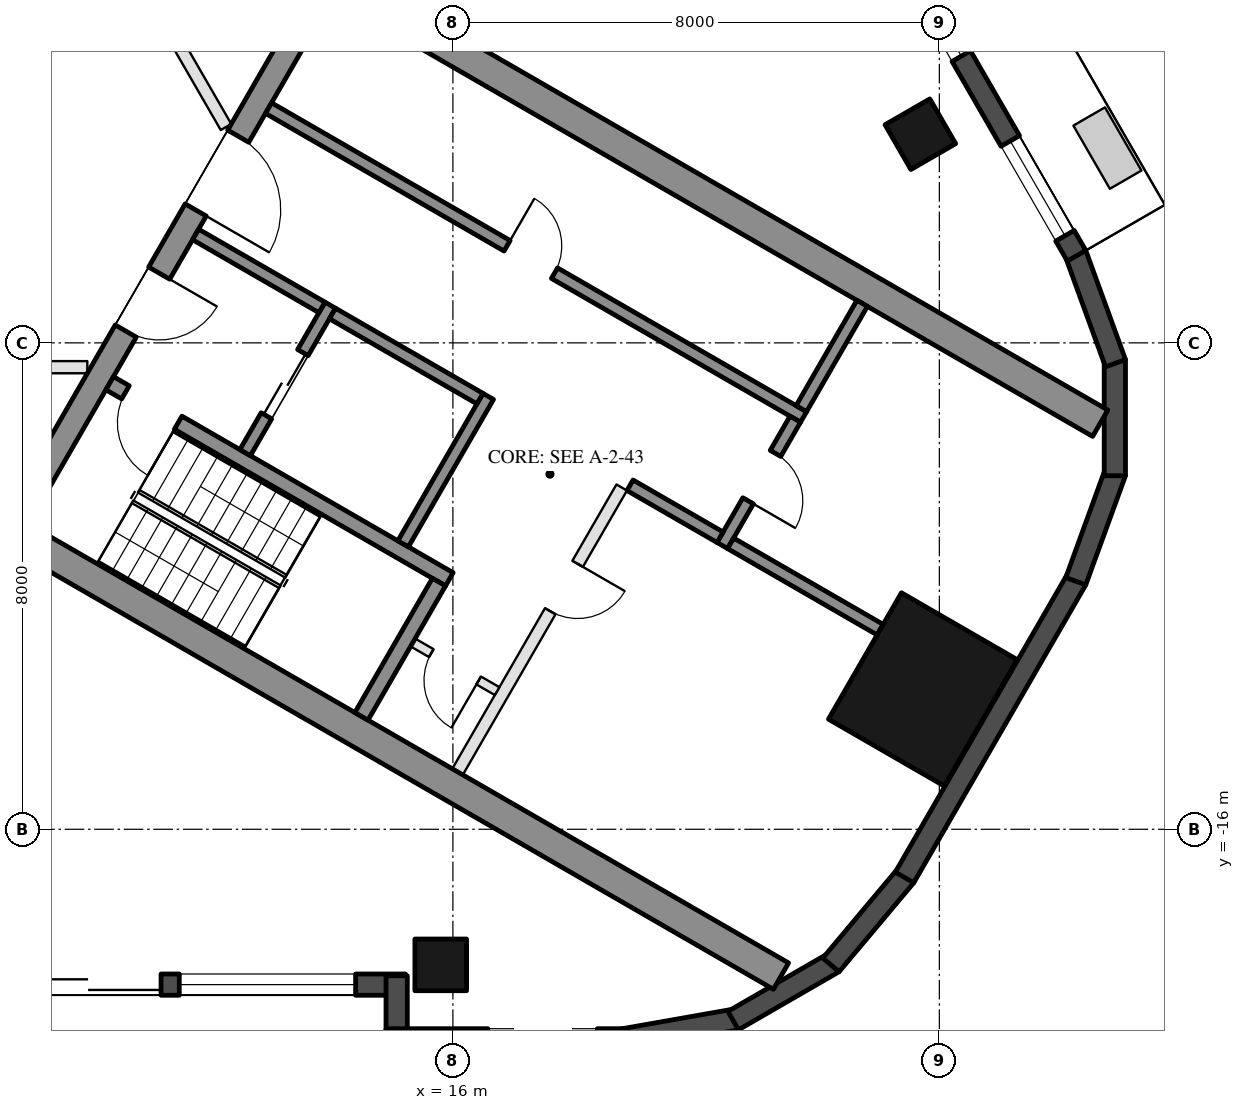
"""IFC4 building model, lengths in metres.
Left out: names, types, materials, properties, quantities, classifications, styles, units other than length and angle.
Written with IfcOpenShell. Run it as: python <this file> out.ifc"""

import sys

from ifc_helpers import new_model, si_unit, direction, frame, frame_2d, origin, origin_2d, place, context, subcontext, project, spatial, rectangle, hollow_rectangle, extrude, element, fill, save


model = new_model("IFC4")
c1 = context("Model", 3, precision=1e-05, world=origin(), true_north=direction((0.0, 1.0)))
c2 = subcontext(c1, "Body", "Model", "MODEL_VIEW")
j1 = project(units=[si_unit("LENGTHUNIT", "METRE"), si_unit("PLANEANGLEUNIT", "RADIAN")], contexts=[c1])
p1 = place(None, origin())
s1 = spatial("IfcSite", under=j1, at=p1, CompositionType="ELEMENT")
p2 = place(p1, origin())
s2 = spatial("IfcBuilding", under=s1, at=p2, CompositionType="ELEMENT")
p3 = place(p2, frame((0.0, 0.0, 183.6)))
s3 = spatial("IfcBuildingStorey", under=s2, at=p3, CompositionType="ELEMENT", Elevation=183.6)
for number, where, z_axis, x_axis in (
    (1, (15.8, -18.23, 0.0), (0.0, 0.0, 1.0), (-1.0, 0.0, 0.0)),
    (2, (23.688, -4.568, 0.0), (0.0, 0.0, 1.0), (-0.5, 0.866, 0.0)),
):
    element("IfcColumn", number, at=place(p3, frame(where, z_axis=z_axis, x_axis=x_axis)), inside=s3, PredefinedType="COLUMN", context=c2, shape_type="SweptSolid", body=[
        extrude(hollow_rectangle(XDim=0.85, YDim=0.85, WallThickness=0.04, at=origin_2d()), origin(), (0.0, 0.0, 1.0), 3.7),
    ])
p4 = place(p3, frame((23.729, -13.7, 0.0), z_axis=(0.0, 0.0, 1.0), x_axis=(0.5, 0.866025403784, 0.0)))
e3 = element("IfcColumn", 3, at=p4, inside=s3, PredefinedType="COLUMN", context=c2, shape_type="SweptSolid", body=[
    extrude(hollow_rectangle(XDim=2.4, YDim=2.2, WallThickness=0.06, at=origin_2d()), origin(), (0.0, 0.0, 1.0), 3.7),
])
p5 = place(p3, frame((8.48, -18.555, 0.0), z_axis=(0.0, 0.0, 1.0), x_axis=(1.0, 0.0, 0.0)))
e4 = element("IfcWall", 4, at=p5, inside=s3, PredefinedType="SOLIDWALL", context=c2, shape_type="SweptSolid", body=[
    extrude(rectangle(XDim=6.74, YDim=0.35, at=frame_2d((3.37, 0.0))), origin(), (0.0, 0.0, 1.0), 3.55),
])
p6 = place(p5, frame((0.32, 0.0, 0.0)))
e5 = element("IfcOpeningElement", 5, at=p6, cuts=e4, PredefinedType="OPENING", context=c2, shape_type="SweptSolid", body=[
    extrude(rectangle(XDim=2.4, YDim=2.4, at=frame_2d((1.2, 1.2))), frame((0.0, 0.185, 0.0), z_axis=(0.0, -1.0, 0.0), x_axis=(1.0, 0.0, 0.0)), (0.0, 0.0, 1.0), 0.37),
])
p7 = place(p5, frame((3.02, 0.0, 0.3)))
e6 = element("IfcOpeningElement", 6, at=p7, cuts=e4, PredefinedType="OPENING", context=c2, shape_type="SweptSolid", body=[
    extrude(rectangle(XDim=2.9, YDim=2.65, at=frame_2d((1.45, 1.325))), frame((0.0, 0.185, 0.0), z_axis=(0.0, -1.0, 0.0), x_axis=(1.0, 0.0, 0.0)), (0.0, 0.0, 1.0), 0.37),
])
p8 = place(p3, frame((15.075, -18.41, 0.0), z_axis=(0.0, 0.0, 1.0), x_axis=(0.0, -1.0, 0.0)))
e7 = element("IfcWall", 7, at=p8, inside=s3, PredefinedType="SOLIDWALL", context=c2, shape_type="SweptSolid", body=[
    extrude(rectangle(XDim=1.22, YDim=0.35, at=frame_2d((0.61, 0.0))), origin(), (0.0, 0.0, 1.0), 3.55),
])
p9 = place(p3, frame((14.9, -19.455, 0.0), z_axis=(0.0, 0.0, 1.0), x_axis=(1.0, 0.0, 0.0)))
e8 = element("IfcWall", 8, at=p9, inside=s3, PredefinedType="SOLIDWALL", context=c2, shape_type="SweptSolid", body=[
    extrude(rectangle(XDim=3.916, YDim=0.35, at=frame_2d((1.958, 0.0))), origin(), (0.0, 0.0, 1.0), 3.55),
])
p10 = place(p9, frame((1.675, 0.0, 0.3)))
e9 = element("IfcOpeningElement", 9, at=p10, cuts=e8, PredefinedType="OPENING", context=c2, shape_type="SweptSolid", body=[
    extrude(rectangle(XDim=1.8, YDim=2.65, at=frame_2d((0.9, 1.325))), frame((0.0, 0.185, 0.0), z_axis=(0.0, -1.0, 0.0), x_axis=(1.0, 0.0, 0.0)), (0.0, 0.0, 1.0), 0.37),
])
p11 = place(p3, frame((18.785, -19.458, 0.0), z_axis=(0.0, 0.0, 1.0), x_axis=(0.984798995425, 0.173697837091, 0.0)))
e10 = element("IfcWall", 10, at=p11, inside=s3, PredefinedType="SOLIDWALL", context=c2, shape_type="SweptSolid", body=[
    extrude(rectangle(XDim=1.91, YDim=0.35, at=frame_2d((0.955, 0.0))), origin(), (0.0, 0.0, 1.0), 3.55),
])
for number, where, z_axis, x_axis in (
    (11, (20.61, -19.147, 0.0), (0.0, 0.0, 1.0), (0.866, 0.5, 0.0)),
    (12, (22.217, -18.231, 0.0), (0.0, 0.0, 1.0), (0.643, 0.766, 0.0)),
):
    element("IfcWall", number, at=place(p3, frame(where, z_axis=z_axis, x_axis=x_axis)), inside=s3, PredefinedType="SOLIDWALL", context=c2, shape_type="SweptSolid", body=[
        extrude(rectangle(XDim=1.91, YDim=0.35, at=frame_2d((0.955, 0.0))), origin(), (0.0, 0.0, 1.0), 3.55),
    ])
p12 = place(p3, frame((23.427, -16.792, 0.0), z_axis=(0.0, 0.0, 1.0), x_axis=(0.500018773155, 0.866014564827, 0.0)))
e13 = element("IfcWall", 13, at=p12, inside=s3, PredefinedType="SOLIDWALL", context=c2, shape_type="SweptSolid", body=[
    extrude(rectangle(XDim=5.658, YDim=0.35, at=frame_2d((2.829, 0.0))), origin(), (0.0, 0.0, 1.0), 3.55),
])
for number, where, z_axis, x_axis in (
    (14, (26.244, -11.92, 0.0), (0.0, 0.0, 1.0), (0.342, 0.94, 0.0)),
    (15, (26.886, -10.185, 0.0), (0.0, 0.0, 1.0), (0.0, 1.0, 0.0)),
    (16, (26.897, -8.335, 0.0), (0.0, 0.0, 1.0), (-0.342, 0.94, 0.0)),
):
    element("IfcWall", number, at=place(p3, frame(where, z_axis=z_axis, x_axis=x_axis)), inside=s3, PredefinedType="SOLIDWALL", context=c2, shape_type="SweptSolid", body=[
        extrude(rectangle(XDim=1.91, YDim=0.35, at=frame_2d((0.955, 0.0))), origin(), (0.0, 0.0, 1.0), 3.55),
    ])
p13 = place(p3, frame((26.257, -6.567, 0.0), z_axis=(0.0, 0.0, 1.0), x_axis=(-0.500023526245, 0.866011820475, 0.0)))
e17 = element("IfcWall", 17, at=p13, inside=s3, PredefinedType="SOLIDWALL", context=c2, shape_type="SweptSolid", body=[
    extrude(rectangle(XDim=11.816, YDim=0.35, at=frame_2d((5.908, 0.0))), origin(), (0.0, 0.0, 1.0), 3.55),
])
p14 = place(p13, frame((0.38, 0.0, 0.3)))
e18 = element("IfcOpeningElement", 18, at=p14, cuts=e17, PredefinedType="OPENING", context=c2, shape_type="SweptSolid", body=[
    extrude(rectangle(XDim=1.8, YDim=2.65, at=frame_2d((0.9, 1.325))), frame((0.0, 0.185, 0.0), z_axis=(0.0, -1.0, 0.0), x_axis=(1.0, 0.0, 0.0)), (0.0, 0.0, 1.0), 0.37),
])
p15 = place(p13, frame((7.741, 0.0, 0.0)))
e19 = element("IfcOpeningElement", 19, at=p15, cuts=e17, PredefinedType="OPENING", context=c2, shape_type="SweptSolid", body=[
    extrude(rectangle(XDim=2.4, YDim=2.4, at=frame_2d((1.2, 1.2))), frame((0.0, 0.185, 0.0), z_axis=(0.0, -1.0, 0.0), x_axis=(1.0, 0.0, 0.0)), (0.0, 0.0, 1.0), 0.37),
])
p16 = place(p13, frame((3.791, 0.0, 0.3)))
e20 = element("IfcOpeningElement", 20, at=p16, cuts=e17, PredefinedType="OPENING", context=c2, shape_type="SweptSolid", body=[
    extrude(rectangle(XDim=1.6, YDim=2.65, at=frame_2d((0.8, 1.325))), frame((0.0, 0.185, 0.0), z_axis=(0.0, -1.0, 0.0), x_axis=(1.0, 0.0, 0.0)), (0.0, 0.0, 1.0), 0.37),
])
p17 = place(p13, frame((5.691, 0.0, 0.3)))
e21 = element("IfcOpeningElement", 21, at=p17, cuts=e17, PredefinedType="OPENING", context=c2, shape_type="SweptSolid", body=[
    extrude(rectangle(XDim=1.6, YDim=2.65, at=frame_2d((0.8, 1.325))), frame((0.0, 0.185, 0.0), z_axis=(0.0, -1.0, 0.0), x_axis=(1.0, 0.0, 0.0)), (0.0, 0.0, 1.0), 0.37),
])
for number, where, z_axis, x_axis in (
    (22, (8.547, -10.997, 0.0), (0.0, 0.0, 1.0), (0.866, -0.5, 0.0)),
    (23, (13.797, -1.903, 0.0), (0.0, 0.0, 1.0), (0.866, -0.5, 0.0)),
):
    element("IfcWall", number, at=place(p3, frame(where, z_axis=z_axis, x_axis=x_axis)), inside=s3, PredefinedType="SHEAR", context=c2, shape_type="SweptSolid", body=[
        extrude(rectangle(XDim=14.837, YDim=0.5, at=frame_2d((7.418, 0.0))), origin(), (0.0, 0.0, 1.0), 3.5),
    ])
p18 = place(p3, frame((8.845, -10.88, 0.0), z_axis=(0.0, 0.0, 1.0), x_axis=(0.500004234368, 0.866022959057, 0.0)))
e24 = element("IfcWall", 24, at=p18, inside=s3, PredefinedType="SHEAR", context=c2, shape_type="SweptSolid", body=[
    extrude(rectangle(XDim=10.0, YDim=0.4, at=frame_2d((5.0, 0.0))), origin(), (0.0, 0.0, 1.0), 3.5),
])
p19 = place(p18, frame((3.55, 0.0, 0.0)))
e25 = element("IfcOpeningElement", 25, at=p19, cuts=e24, PredefinedType="OPENING", context=c2, shape_type="SweptSolid", body=[
    extrude(rectangle(XDim=1.1, YDim=2.1, at=frame_2d((0.55, 1.05))), frame((0.0, 0.21, 0.0), z_axis=(0.0, -1.0, 0.0), x_axis=(1.0, 0.0, 0.0)), (0.0, 0.0, 1.0), 0.42),
])
p20 = place(p18, frame((5.85, 0.0, 0.0)))
e26 = element("IfcOpeningElement", 26, at=p20, cuts=e24, PredefinedType="OPENING", context=c2, shape_type="SweptSolid", body=[
    extrude(rectangle(XDim=1.4, YDim=2.1, at=frame_2d((0.7, 1.05))), frame((0.0, 0.21, 0.0), z_axis=(0.0, -1.0, 0.0), x_axis=(1.0, 0.0, 0.0)), (0.0, 0.0, 1.0), 0.42),
])
p21 = place(p3, frame((10.356, -8.664, 0.0), z_axis=(0.0, 0.0, 1.0), x_axis=(0.866028629588, -0.499994412703, 0.0)))
e27 = element("IfcWall", 27, at=p21, inside=s3, PredefinedType="SHEAR", context=c2, shape_type="SweptSolid", body=[
    extrude(rectangle(XDim=6.45, YDim=0.25, at=frame_2d((3.225, 0.0))), origin(), (0.0, 0.0, 1.0), 3.5),
])
p22 = place(p21, frame((0.3, 0.0, 0.0)))
e28 = element("IfcOpeningElement", 28, at=p22, cuts=e27, PredefinedType="OPENING", context=c2, shape_type="SweptSolid", body=[
    extrude(rectangle(XDim=1.0, YDim=2.1, at=frame_2d((0.5, 1.05))), frame((0.0, 0.135, 0.0), z_axis=(0.0, -1.0, 0.0), x_axis=(1.0, 0.0, 0.0)), (0.0, 0.0, 1.0), 0.27),
])
p23 = place(p3, frame((14.496, -14.143, 0.0), z_axis=(0.0, 0.0, 1.0), x_axis=(0.500062241894, 0.865989465428, 0.0)))
e29 = element("IfcWall", 29, at=p23, inside=s3, PredefinedType="SHEAR", context=c2, shape_type="SweptSolid", body=[
    extrude(rectangle(XDim=2.55, YDim=0.25, at=frame_2d((1.275, 0.0))), origin(), (0.0, 0.0, 1.0), 3.5),
])
p24 = place(p3, frame((15.181, -11.305, 0.0), z_axis=(0.0, 0.0, 1.0), x_axis=(0.49994636267, 0.866056369097, 0.0)))
e30 = element("IfcWall", 30, at=p24, inside=s3, PredefinedType="SHEAR", context=c2, shape_type="SweptSolid", body=[
    extrude(rectangle(XDim=2.8, YDim=0.2, at=frame_2d((1.4, 0.0))), origin(), (0.0, 0.0, 1.0), 3.5),
])
p25 = place(p3, frame((12.583, -9.805, 0.0), z_axis=(0.0, 0.0, 1.0), x_axis=(0.49994636267, 0.866056369097, 0.0)))
e31 = element("IfcWall", 31, at=p25, inside=s3, PredefinedType="SHEAR", context=c2, shape_type="SweptSolid", body=[
    extrude(rectangle(XDim=2.8, YDim=0.2, at=frame_2d((1.4, 0.0))), origin(), (0.0, 0.0, 1.0), 3.5),
])
p26 = place(p25, frame((0.7, 0.0, 0.0)))
e32 = element("IfcOpeningElement", 32, at=p26, cuts=e31, PredefinedType="OPENING", context=c2, shape_type="SweptSolid", body=[
    extrude(rectangle(XDim=1.2, YDim=2.1, at=frame_2d((0.6, 1.05))), frame((0.0, 0.11, 0.0), z_axis=(0.0, -1.0, 0.0), x_axis=(1.0, 0.0, 0.0)), (0.0, 0.0, 1.0), 0.22),
])
p27 = place(p3, frame((11.768, -6.217, 0.0), z_axis=(0.0, 0.0, 1.0), x_axis=(0.866050077142, -0.499957262057, 0.0)))
e33 = element("IfcWall", 33, at=p27, inside=s3, PredefinedType="SHEAR", context=c2, shape_type="SweptSolid", body=[
    extrude(rectangle(XDim=2.4, YDim=0.2, at=frame_2d((1.2, 0.0))), origin(), (0.0, 0.0, 1.0), 3.5),
])
p28 = place(p3, frame((14.02, -7.517, 0.0), z_axis=(0.0, 0.0, 1.0), x_axis=(0.866034573852, -0.49998411664, 0.0)))
e34 = element("IfcWall", 34, at=p28, inside=s3, PredefinedType="SHEAR", context=c2, shape_type="SweptSolid", body=[
    extrude(rectangle(XDim=2.8, YDim=0.2, at=frame_2d((1.4, 0.0))), origin(), (0.0, 0.0, 1.0), 3.5),
])
p29 = place(p3, frame((12.968, -4.138, 0.0), z_axis=(0.0, 0.0, 1.0), x_axis=(0.866028328073, -0.49999493495, 0.0)))
e35 = element("IfcWall", 35, at=p29, inside=s3, PredefinedType="SHEAR", context=c2, shape_type="SweptSolid", body=[
    extrude(rectangle(XDim=10.16, YDim=0.2, at=frame_2d((5.08, 0.0))), origin(), (0.0, 0.0, 1.0), 3.5),
])
p30 = place(p29, frame((4.53, 0.0, 0.0)))
e36 = element("IfcOpeningElement", 36, at=p30, cuts=e35, PredefinedType="OPENING", context=c2, shape_type="SweptSolid", body=[
    extrude(rectangle(XDim=0.9, YDim=2.1, at=frame_2d((0.45, 1.05))), frame((0.0, 0.11, 0.0), z_axis=(0.0, -1.0, 0.0), x_axis=(1.0, 0.0, 0.0)), (0.0, 0.0, 1.0), 0.22),
])
p31 = place(p3, frame((20.43, -11.333, 0.0), z_axis=(0.0, 0.0, 1.0), x_axis=(0.500001309137, 0.866024647952, 0.0)))
e37 = element("IfcWall", 37, at=p31, inside=s3, PredefinedType="SHEAR", context=c2, shape_type="SweptSolid", body=[
    extrude(rectangle(XDim=2.4, YDim=0.2, at=frame_2d((1.2, 0.0))), origin(), (0.0, 0.0, 1.0), 3.5),
])
p32 = place(p31, frame((0.85, 0.0, 0.0)))
e38 = element("IfcOpeningElement", 38, at=p32, cuts=e37, PredefinedType="OPENING", context=c2, shape_type="SweptSolid", body=[
    extrude(rectangle(XDim=0.9, YDim=2.1, at=frame_2d((0.45, 1.05))), frame((0.0, 0.11, 0.0), z_axis=(0.0, -1.0, 0.0), x_axis=(1.0, 0.0, 0.0)), (0.0, 0.0, 1.0), 0.22),
])
p33 = place(p3, frame((18.913, -10.342, 0.0), z_axis=(0.0, 0.0, 1.0), x_axis=(0.866038183914, -0.499977863513, 0.0)))
e39 = element("IfcWall", 39, at=p33, inside=s3, PredefinedType="SHEAR", context=c2, shape_type="SweptSolid", body=[
    extrude(rectangle(XDim=1.71, YDim=0.2, at=frame_2d((0.855, 0.0))), origin(), (0.0, 0.0, 1.0), 3.5),
])
p34 = place(p3, frame((21.73, -9.082, 0.0), z_axis=(0.0, 0.0, 1.0), x_axis=(0.50002537861, 0.866010750942, 0.0)))
e40 = element("IfcWall", 40, at=p34, inside=s3, PredefinedType="SHEAR", context=c2, shape_type="SweptSolid", body=[
    extrude(rectangle(XDim=2.0, YDim=0.2, at=frame_2d((1.0, 0.0))), origin(), (0.0, 0.0, 1.0), 3.5),
])
p35 = place(p3, frame((20.567, -11.297, 0.0), z_axis=(0.0, 0.0, 1.0), x_axis=(0.866055327414, -0.49994816717, 0.0)))
e41 = element("IfcWall", 41, at=p35, inside=s3, PredefinedType="SHEAR", context=c2, shape_type="SweptSolid", body=[
    extrude(rectangle(XDim=2.84, YDim=0.2, at=frame_2d((1.42, 0.0))), origin(), (0.0, 0.0, 1.0), 3.5),
])
p36 = place(p3, frame((16.076, -15.055, 0.0), z_axis=(0.0, 0.0, 1.0), x_axis=(0.499995103361, 0.866028230842, 0.0)))
e42 = element("IfcWall", 42, at=p36, inside=s3, PredefinedType="PARTITIONING", context=c2, shape_type="SweptSolid", body=[
    extrude(rectangle(XDim=5.4, YDim=0.2, at=frame_2d((2.7, 0.0))), origin(), (0.0, 0.0, 1.0), 3.5),
])
p37 = place(p36, frame((3.05, 0.0, 0.0)))
e43 = element("IfcOpeningElement", 43, at=p37, cuts=e42, PredefinedType="OPENING", context=c2, shape_type="SweptSolid", body=[
    extrude(rectangle(XDim=0.9, YDim=2.1, at=frame_2d((0.45, 1.05))), frame((0.0, 0.11, 0.0), z_axis=(0.0, -1.0, 0.0), x_axis=(1.0, 0.0, 0.0)), (0.0, 0.0, 1.0), 0.22),
])
p38 = place(p3, frame((15.342, -12.928, 0.0), z_axis=(0.0, 0.0, 1.0), x_axis=(0.865989903783, -0.500061482766, 0.0)))
e44 = element("IfcWall", 44, at=p38, inside=s3, PredefinedType="PARTITIONING", context=c2, shape_type="SweptSolid", body=[
    extrude(rectangle(XDim=1.6, YDim=0.15, at=frame_2d((0.8, 0.0))), origin(), (0.0, 0.0, 1.0), 3.5),
])
p39 = place(p38, frame((0.35, 0.0, 0.0)))
e45 = element("IfcOpeningElement", 45, at=p39, cuts=e44, PredefinedType="OPENING", context=c2, shape_type="SweptSolid", body=[
    extrude(rectangle(XDim=0.9, YDim=2.1, at=frame_2d((0.45, 1.05))), frame((0.0, 0.085, 0.0), z_axis=(0.0, -1.0, 0.0), x_axis=(1.0, 0.0, 0.0)), (0.0, 0.0, 1.0), 0.17),
])
p40 = place(p3, frame((9.988, -8.4, 0.0), z_axis=(0.0, 0.0, 1.0), x_axis=(-1.0, 0.0, 0.0)))
e46 = element("IfcWall", 46, at=p40, inside=s3, PredefinedType="PARTITIONING", context=c2, shape_type="SweptSolid", body=[
    extrude(rectangle(XDim=6.185, YDim=0.2, at=frame_2d((3.092, 0.0))), origin(), (0.0, 0.0, 1.0), 2.95),
])
p41 = place(p40, frame((2.592, 0.0, 0.0)))
e47 = element("IfcOpeningElement", 47, at=p41, cuts=e46, PredefinedType="OPENING", context=c2, shape_type="SweptSolid", body=[
    extrude(rectangle(XDim=1.0, YDim=2.1, at=frame_2d((0.5, 1.05))), frame((0.0, 0.11, 0.0), z_axis=(0.0, -1.0, 0.0), x_axis=(1.0, 0.0, 0.0)), (0.0, 0.0, 1.0), 0.22),
])
p42 = place(p3, frame((9.725, -0.043, 0.0), z_axis=(0.0, 0.0, 1.0), x_axis=(0.500014573982, -0.866016989329, 0.0)))
e48 = element("IfcWall", 48, at=p42, inside=s3, PredefinedType="PARTITIONING", context=c2, shape_type="SweptSolid", body=[
    extrude(rectangle(XDim=5.088, YDim=0.2, at=frame_2d((2.544, 0.0))), origin(), (0.0, 0.0, 1.0), 2.95),
])
p43 = place(p42, frame((2.044, 0.0, 0.0)))
e49 = element("IfcOpeningElement", 49, at=p43, cuts=e48, PredefinedType="OPENING", context=c2, shape_type="SweptSolid", body=[
    extrude(rectangle(XDim=1.0, YDim=2.1, at=frame_2d((0.5, 1.05))), frame((0.0, 0.11, 0.0), z_axis=(0.0, -1.0, 0.0), x_axis=(1.0, 0.0, 0.0)), (0.0, 0.0, 1.0), 0.22),
])
p44 = place(p6, frame((2.4, 0.0, 0.0), z_axis=(0.0, 0.0, 1.0), x_axis=(-1.0, 0.0, 0.0)))
e50 = element("IfcDoor", 50, at=p44, inside=s3, OperationType="SLIDING_TO_LEFT", PredefinedType="DOOR", context=c2, shape_type="SweptSolid", body=[
    extrude(rectangle(XDim=2.4, YDim=2.4, at=frame_2d((1.2, 1.2))), frame((0.0, 0.025, 0.0), z_axis=(0.0, -1.0, 0.0), x_axis=(1.0, 0.0, 0.0)), (0.0, 0.0, 1.0), 0.05),
])
fill(e5, e50)
p45 = place(p7, origin())
e51 = element("IfcWindow", 51, at=p45, inside=s3, PartitioningType="SINGLE_PANEL", PredefinedType="WINDOW", context=c2, shape_type="SweptSolid", body=[
    extrude(rectangle(XDim=2.9, YDim=2.65, at=frame_2d((1.45, 1.325))), frame((0.0, 0.03, 0.0), z_axis=(0.0, -1.0, 0.0), x_axis=(1.0, 0.0, 0.0)), (0.0, 0.0, 1.0), 0.06),
])
fill(e6, e51)
p46 = place(p14, origin())
e52 = element("IfcWindow", 52, at=p46, inside=s3, PartitioningType="SINGLE_PANEL", PredefinedType="WINDOW", context=c2, shape_type="SweptSolid", body=[
    extrude(rectangle(XDim=1.8, YDim=2.65, at=frame_2d((0.9, 1.325))), frame((0.0, 0.03, 0.0), z_axis=(0.0, -1.0, 0.0), x_axis=(1.0, 0.0, 0.0)), (0.0, 0.0, 1.0), 0.06),
])
fill(e18, e52)
p47 = place(p16, origin())
e53 = element("IfcWindow", 53, at=p47, inside=s3, PartitioningType="SINGLE_PANEL", PredefinedType="WINDOW", context=c2, shape_type="SweptSolid", body=[
    extrude(rectangle(XDim=1.6, YDim=2.65, at=frame_2d((0.8, 1.325))), frame((0.0, 0.03, 0.0), z_axis=(0.0, -1.0, 0.0), x_axis=(1.0, 0.0, 0.0)), (0.0, 0.0, 1.0), 0.06),
])
fill(e20, e53)
p48 = place(p26, origin())
e54 = element("IfcDoor", 54, at=p48, inside=s3, OperationType="DOUBLE_DOOR_SLIDING", PredefinedType="DOOR", context=c2, shape_type="SweptSolid", body=[
    extrude(rectangle(XDim=1.2, YDim=2.1, at=frame_2d((0.6, 1.05))), frame((0.0, 0.025, 0.0), z_axis=(0.0, -1.0, 0.0), x_axis=(1.0, 0.0, 0.0)), (0.0, 0.0, 1.0), 0.05),
])
fill(e32, e54)
p49 = place(p39, frame((0.9, 0.0, 0.0), z_axis=(0.0, 0.0, 1.0), x_axis=(-1.0, 0.0, 0.0)))
e55 = element("IfcDoor", 55, at=p49, inside=s3, OperationType="SINGLE_SWING_LEFT", PredefinedType="DOOR", context=c2, shape_type="SweptSolid", body=[
    extrude(rectangle(XDim=0.9, YDim=2.1, at=frame_2d((0.45, 1.05))), frame((0.0, 0.025, 0.0), z_axis=(0.0, -1.0, 0.0), x_axis=(1.0, 0.0, 0.0)), (0.0, 0.0, 1.0), 0.05),
])
fill(e45, e55)
p50 = place(p30, origin())
e56 = element("IfcDoor", 56, at=p50, inside=s3, OperationType="SINGLE_SWING_LEFT", PredefinedType="DOOR", context=c2, shape_type="SweptSolid", body=[
    extrude(rectangle(XDim=0.9, YDim=2.1, at=frame_2d((0.45, 1.05))), frame((0.0, 0.025, 0.0), z_axis=(0.0, -1.0, 0.0), x_axis=(1.0, 0.0, 0.0)), (0.0, 0.0, 1.0), 0.05),
])
fill(e36, e56)
p51 = place(p32, frame((0.9, 0.0, 0.0), z_axis=(0.0, 0.0, 1.0), x_axis=(-1.0, 0.0, 0.0)))
e57 = element("IfcDoor", 57, at=p51, inside=s3, OperationType="SINGLE_SWING_RIGHT", PredefinedType="DOOR", context=c2, shape_type="SweptSolid", body=[
    extrude(rectangle(XDim=0.9, YDim=2.1, at=frame_2d((0.45, 1.05))), frame((0.0, 0.025, 0.0), z_axis=(0.0, -1.0, 0.0), x_axis=(1.0, 0.0, 0.0)), (0.0, 0.0, 1.0), 0.05),
])
fill(e38, e57)
p52 = place(p37, frame((0.9, 0.0, 0.0), z_axis=(0.0, 0.0, 1.0), x_axis=(-1.0, 0.0, 0.0)))
e58 = element("IfcDoor", 58, at=p52, inside=s3, OperationType="SINGLE_SWING_LEFT", PredefinedType="DOOR", context=c2, shape_type="SweptSolid", body=[
    extrude(rectangle(XDim=0.9, YDim=2.1, at=frame_2d((0.45, 1.05))), frame((0.0, 0.025, 0.0), z_axis=(0.0, -1.0, 0.0), x_axis=(1.0, 0.0, 0.0)), (0.0, 0.0, 1.0), 0.05),
])
fill(e43, e58)
p53 = place(p19, frame((1.1, 0.0, 0.0), z_axis=(0.0, 0.0, 1.0), x_axis=(-1.0, 0.0, 0.0)))
e59 = element("IfcDoor", 59, at=p53, inside=s3, OperationType="SINGLE_SWING_LEFT", PredefinedType="DOOR", context=c2, shape_type="SweptSolid", body=[
    extrude(rectangle(XDim=1.1, YDim=2.1, at=frame_2d((0.55, 1.05))), frame((0.0, 0.025, 0.0), z_axis=(0.0, -1.0, 0.0), x_axis=(1.0, 0.0, 0.0)), (0.0, 0.0, 1.0), 0.05),
])
fill(e25, e59)
p54 = place(p20, frame((1.4, 0.0, 0.0), z_axis=(0.0, 0.0, 1.0), x_axis=(-1.0, 0.0, 0.0)))
e60 = element("IfcDoor", 60, at=p54, inside=s3, OperationType="DOUBLE_DOOR_SINGLE_SWING", PredefinedType="DOOR", context=c2, shape_type="SweptSolid", body=[
    extrude(rectangle(XDim=1.4, YDim=2.1, at=frame_2d((0.7, 1.05))), frame((0.0, 0.025, 0.0), z_axis=(0.0, -1.0, 0.0), x_axis=(1.0, 0.0, 0.0)), (0.0, 0.0, 1.0), 0.05),
])
fill(e26, e60)
p55 = place(p22, frame((1.0, 0.0, 0.0), z_axis=(0.0, 0.0, 1.0), x_axis=(-1.0, 0.0, 0.0)))
e61 = element("IfcDoor", 61, at=p55, inside=s3, OperationType="SINGLE_SWING_LEFT", PredefinedType="DOOR", context=c2, shape_type="SweptSolid", body=[
    extrude(rectangle(XDim=1.0, YDim=2.1, at=frame_2d((0.5, 1.05))), frame((0.0, 0.025, 0.0), z_axis=(0.0, -1.0, 0.0), x_axis=(1.0, 0.0, 0.0)), (0.0, 0.0, 1.0), 0.05),
])
fill(e28, e61)
save(model, sys.argv[1])
